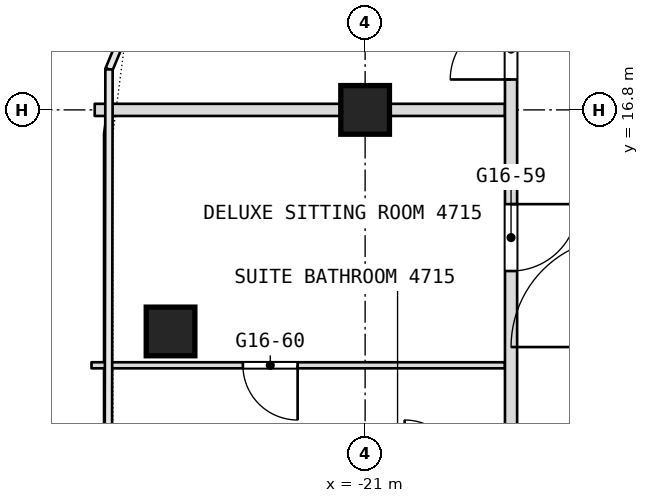
"""IFC4 building model, lengths in metres.
Left out: names, types, materials, properties, quantities, classifications, styles, units other than length and angle.
Written with IfcOpenShell. Run it as: python <this file> out.ifc"""

import sys

from ifc_helpers import new_model, si_unit, direction, frame, frame_2d, origin, origin_2d, place, context, subcontext, project, spatial, rectangle, extrude, element, fill, save


model = new_model("IFC4")
c1 = context("Model", 3, precision=1e-05, world=origin(), true_north=direction((0.0, 1.0)))
c2 = subcontext(c1, "Body", "Model", "MODEL_VIEW")
j1 = project(units=[si_unit("LENGTHUNIT", "METRE"), si_unit("PLANEANGLEUNIT", "RADIAN")], contexts=[c1])
p1 = place(None, origin())
s1 = spatial("IfcSite", under=j1, at=p1, CompositionType="ELEMENT")
p2 = place(p1, origin())
s2 = spatial("IfcBuilding", under=s1, at=p2, CompositionType="ELEMENT")
p3 = place(p2, frame((0.0, 0.0, 205.7)))
s3 = spatial("IfcBuildingStorey", under=s2, at=p3, CompositionType="ELEMENT", Elevation=205.7)
for number, where, z_axis, x_axis in (
    (1, (-21.0, 16.8, 0.0), (0.0, 0.0, 1.0), (1.0, 0.0, 0.0)),
    (2, (-24.2, 13.156, 0.0), (0.0, 0.0, 1.0), (1.0, 0.0, 0.0)),
):
    element("IfcColumn", number, at=place(p3, frame(where, z_axis=z_axis, x_axis=x_axis)), inside=s3, PredefinedType="COLUMN", context=c2, shape_type="SweptSolid", body=[
        extrude(rectangle(XDim=0.8, YDim=0.8, at=origin_2d()), origin(), (0.0, 0.0, 1.0), 3.6),
    ])
p4 = place(p3, frame((-25.5, 12.6, 0.0), z_axis=(0.0, 0.0, 1.0), x_axis=(1.0, 0.0, 0.0)))
e3 = element("IfcWall", 3, at=p4, inside=s3, PredefinedType="PARTITIONING", context=c2, shape_type="SweptSolid", body=[
    extrude(rectangle(XDim=6.8, YDim=0.1, at=frame_2d((3.4, 0.0))), origin(), (0.0, 0.0, 1.0), 3.34),
])
p5 = place(p4, frame((2.49, 0.0, 0.0)))
e4 = element("IfcOpeningElement", 4, at=p5, cuts=e3, PredefinedType="OPENING", context=c2, shape_type="SweptSolid", body=[
    extrude(rectangle(XDim=0.9, YDim=2.1, at=frame_2d((0.45, 1.05))), frame((0.0, 0.05, 0.0), z_axis=(0.0, -1.0, 0.0), x_axis=(1.0, 0.0, 0.0)), (0.0, 0.0, 1.0), 0.1),
])
p6 = place(p3, frame((-25.447, 16.8, 0.0), z_axis=(0.0, 0.0, 1.0), x_axis=(1.0, 0.0, 0.0)))
e5 = element("IfcWall", 5, at=p6, inside=s3, PredefinedType="PARTITIONING", context=c2, shape_type="SweptSolid", body=[
    extrude(rectangle(XDim=6.747, YDim=0.2, at=frame_2d((3.374, 0.0))), origin(), (0.0, 0.0, 1.0), 2.94),
])
p7 = place(p3, frame((-18.6, -26.751, 0.0), z_axis=(0.0, 0.0, 1.0), x_axis=(0.0, 1.0, 0.0)))
e6 = element("IfcWall", 6, at=p7, inside=s3, PredefinedType="PARTITIONING", context=c2, shape_type="SweptSolid", body=[
    extrude(rectangle(XDim=49.091, YDim=0.2, at=frame_2d((24.545, 0.0))), origin(), (0.0, 0.0, 1.0), 3.34),
])
p8 = place(p7, frame((4.576, 0.0, 0.0)))
e7 = element("IfcOpeningElement", 7, at=p8, cuts=e6, PredefinedType="OPENING", context=c2, shape_type="SweptSolid", body=[
    extrude(rectangle(XDim=1.1, YDim=2.1, at=frame_2d((0.55, 1.05))), frame((0.0, 0.1, 0.0), z_axis=(0.0, -1.0, 0.0), x_axis=(1.0, 0.0, 0.0)), (0.0, 0.0, 1.0), 0.2),
])
p9 = place(p7, frame((10.351, 0.0, 0.0)))
e8 = element("IfcOpeningElement", 8, at=p9, cuts=e6, PredefinedType="OPENING", context=c2, shape_type="SweptSolid", body=[
    extrude(rectangle(XDim=1.0, YDim=2.1, at=frame_2d((0.5, 1.05))), frame((0.0, 0.1, 0.0), z_axis=(0.0, -1.0, 0.0), x_axis=(1.0, 0.0, 0.0)), (0.0, 0.0, 1.0), 0.2),
])
p10 = place(p7, frame((16.951, 0.0, 0.0)))
e9 = element("IfcOpeningElement", 9, at=p10, cuts=e6, PredefinedType="OPENING", context=c2, shape_type="SweptSolid", body=[
    extrude(rectangle(XDim=1.0, YDim=2.1, at=frame_2d((0.5, 1.05))), frame((0.0, 0.1, 0.0), z_axis=(0.0, -1.0, 0.0), x_axis=(1.0, 0.0, 0.0)), (0.0, 0.0, 1.0), 0.2),
])
p11 = place(p7, frame((22.051, 0.0, 0.0)))
e10 = element("IfcOpeningElement", 10, at=p11, cuts=e6, PredefinedType="OPENING", context=c2, shape_type="SweptSolid", body=[
    extrude(rectangle(XDim=1.1, YDim=2.1, at=frame_2d((0.55, 1.05))), frame((0.0, 0.1, 0.0), z_axis=(0.0, -1.0, 0.0), x_axis=(1.0, 0.0, 0.0)), (0.0, 0.0, 1.0), 0.2),
])
p12 = place(p7, frame((30.351, 0.0, 0.0)))
e11 = element("IfcOpeningElement", 11, at=p12, cuts=e6, PredefinedType="OPENING", context=c2, shape_type="SweptSolid", body=[
    extrude(rectangle(XDim=1.1, YDim=2.1, at=frame_2d((0.55, 1.05))), frame((0.0, 0.1, 0.0), z_axis=(0.0, -1.0, 0.0), x_axis=(1.0, 0.0, 0.0)), (0.0, 0.0, 1.0), 0.2),
])
p13 = place(p7, frame((40.901, 0.0, 0.0)))
e12 = element("IfcOpeningElement", 12, at=p13, cuts=e6, PredefinedType="OPENING", context=c2, shape_type="SweptSolid", body=[
    extrude(rectangle(XDim=1.1, YDim=2.1, at=frame_2d((0.55, 1.05))), frame((0.0, 0.1, 0.0), z_axis=(0.0, -1.0, 0.0), x_axis=(1.0, 0.0, 0.0)), (0.0, 0.0, 1.0), 0.2),
])
p14 = place(p7, frame((44.051, 0.0, 0.0)))
e13 = element("IfcOpeningElement", 13, at=p14, cuts=e6, PredefinedType="OPENING", context=c2, shape_type="SweptSolid", body=[
    extrude(rectangle(XDim=1.0, YDim=2.1, at=frame_2d((0.5, 1.05))), frame((0.0, 0.1, 0.0), z_axis=(0.0, -1.0, 0.0), x_axis=(1.0, 0.0, 0.0)), (0.0, 0.0, 1.0), 0.2),
])
p15 = place(p5, origin())
e14 = element("IfcDoor", 14, at=p15, inside=s3, OperationType="SINGLE_SWING_RIGHT", PredefinedType="DOOR", context=c2, shape_type="SweptSolid", body=[
    extrude(rectangle(XDim=0.9, YDim=2.1, at=frame_2d((0.45, 1.05))), frame((0.0, 0.025, 0.0), z_axis=(0.0, -1.0, 0.0), x_axis=(1.0, 0.0, 0.0)), (0.0, 0.0, 1.0), 0.05),
])
fill(e4, e14)
p16 = place(p13, origin())
e15 = element("IfcDoor", 15, at=p16, inside=s3, OperationType="SINGLE_SWING_RIGHT", PredefinedType="DOOR", context=c2, shape_type="SweptSolid", body=[
    extrude(rectangle(XDim=1.1, YDim=2.1, at=frame_2d((0.55, 1.05))), frame((0.0, 0.025, 0.0), z_axis=(0.0, -1.0, 0.0), x_axis=(1.0, 0.0, 0.0)), (0.0, 0.0, 1.0), 0.05),
])
fill(e12, e15)
p17 = place(p14, origin())
e16 = element("IfcDoor", 16, at=p17, inside=s3, OperationType="SINGLE_SWING_LEFT", PredefinedType="DOOR", context=c2, shape_type="SweptSolid", body=[
    extrude(rectangle(XDim=1.0, YDim=2.1, at=frame_2d((0.5, 1.05))), frame((0.0, 0.025, 0.0), z_axis=(0.0, -1.0, 0.0), x_axis=(1.0, 0.0, 0.0)), (0.0, 0.0, 1.0), 0.05),
])
fill(e13, e16)
save(model, sys.argv[1])
